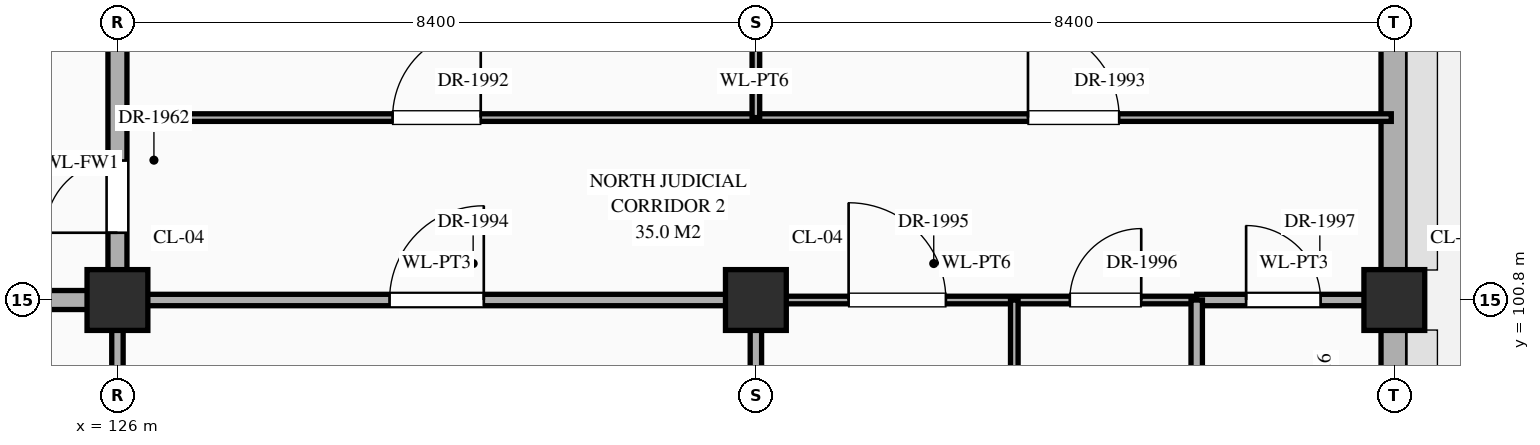
"""IFC4 building model, lengths in metres.
Left out: names, types, materials, properties, quantities, classifications, styles, units other than length and angle.
Written with IfcOpenShell. Run it as: python <this file> out.ifc"""

import sys

from ifc_helpers import new_model, si_unit, direction, frame, frame_2d, origin, origin_2d, place, context, subcontext, project, spatial, rectangle, extrude, element, fill, save


model = new_model("IFC4")
c1 = context("Model", 3, precision=1e-05, world=origin(), true_north=direction((0.0, 1.0)))
c2 = subcontext(c1, "Body", "Model", "MODEL_VIEW")
j1 = project(units=[si_unit("LENGTHUNIT", "METRE"), si_unit("PLANEANGLEUNIT", "RADIAN")], contexts=[c1])
p1 = place(None, origin())
s1 = spatial("IfcSite", under=j1, at=p1, CompositionType="ELEMENT")
p2 = place(p1, origin())
s2 = spatial("IfcBuilding", under=s1, at=p2, CompositionType="ELEMENT")
p3 = place(p2, frame((0.0, 0.0, 21.6)))
s3 = spatial("IfcBuildingStorey", under=s2, at=p3, CompositionType="ELEMENT", Elevation=21.6)
for number, where, z_axis, x_axis in (
    (1, (126.0, 100.8, 0.0), (0.0, 0.0, 1.0), (1.0, 0.0, 0.0)),
    (2, (134.4, 100.8, 0.0), (0.0, 0.0, 1.0), (1.0, 0.0, 0.0)),
    (3, (142.8, 100.8, 0.0), (0.0, 0.0, 1.0), (1.0, 0.0, 0.0)),
):
    element("IfcColumn", number, at=place(p3, frame(where, z_axis=z_axis, x_axis=x_axis)), inside=s3, PredefinedType="COLUMN", context=c2, shape_type="SweptSolid", body=[
        extrude(rectangle(XDim=0.8, YDim=0.8, at=origin_2d()), origin(), (0.0, 0.0, 1.0), 4.5),
    ])
p4 = place(p3, frame((142.8, 93.995, 0.0), z_axis=(0.0, 0.0, 1.0), x_axis=(0.0, 1.0, 0.0)))
e4 = element("IfcWall", 4, at=p4, inside=s3, PredefinedType="STANDARD", context=c2, shape_type="SweptSolid", body=[
    extrude(rectangle(XDim=6.41, YDim=0.35, at=frame_2d((3.205, 0.0))), origin(), (0.0, 0.0, 1.0), 3.59),
])
p5 = place(p4, frame((3.73, 0.0, 0.85)))
e5 = element("IfcOpeningElement", 5, at=p5, cuts=e4, PredefinedType="OPENING", context=c2, shape_type="SweptSolid", body=[
    extrude(rectangle(XDim=1.55, YDim=1.38, at=frame_2d((0.775, 0.69))), frame((0.0, 0.187, 0.0), z_axis=(0.0, -1.0, 0.0), x_axis=(1.0, 0.0, 0.0)), (0.0, 0.0, 1.0), 0.374),
])
p6 = place(p3, frame((142.8, 101.195, 0.0), z_axis=(0.0, 0.0, 1.0), x_axis=(0.0, 1.0, 0.0)))
e6 = element("IfcWall", 6, at=p6, inside=s3, PredefinedType="STANDARD", context=c2, shape_type="SweptSolid", body=[
    extrude(rectangle(XDim=6.41, YDim=0.35, at=frame_2d((3.205, 0.0))), origin(), (0.0, 0.0, 1.0), 3.59),
])
p7 = place(p6, frame((3.73, 0.0, 0.85)))
e7 = element("IfcOpeningElement", 7, at=p7, cuts=e6, PredefinedType="OPENING", context=c2, shape_type="SweptSolid", body=[
    extrude(rectangle(XDim=1.55, YDim=1.56, at=frame_2d((0.775, 0.78))), frame((0.0, 0.187, 0.0), z_axis=(0.0, -1.0, 0.0), x_axis=(1.0, 0.0, 0.0)), (0.0, 0.0, 1.0), 0.374),
])
p8 = place(p3, frame((121.8, 100.8, 0.0), z_axis=(0.0, 0.0, 1.0), x_axis=(1.0, 0.0, 0.0)))
e8 = element("IfcWall", 8, at=p8, inside=s3, PredefinedType="STANDARD", context=c2, shape_type="SweptSolid", body=[
    extrude(rectangle(XDim=4.2, YDim=0.25, at=frame_2d((2.1, 0.0))), origin(), (0.0, 0.0, 1.0), 3.39),
])
p9 = place(p3, frame((126.0, 100.8, 0.0), z_axis=(0.0, 0.0, 1.0), x_axis=(1.0, 0.0, 0.0)))
e9 = element("IfcWall", 9, at=p9, inside=s3, PredefinedType="STANDARD", context=c2, shape_type="SweptSolid", body=[
    extrude(rectangle(XDim=8.4, YDim=0.15, at=frame_2d((4.2, 0.0))), origin(), (0.0, 0.0, 1.0), 3.39),
])
p10 = place(p9, frame((3.58, 0.0, 0.0)))
e10 = element("IfcOpeningElement", 10, at=p10, cuts=e9, PredefinedType="OPENING", context=c2, shape_type="SweptSolid", body=[
    extrude(rectangle(XDim=1.24, YDim=2.3, at=frame_2d((0.62, 1.15))), frame((0.0, 0.087, 0.0), z_axis=(0.0, -1.0, 0.0), x_axis=(1.0, 0.0, 0.0)), (0.0, 0.0, 1.0), 0.174),
])
p11 = place(p3, frame((134.4, 100.8, 0.0), z_axis=(0.0, 0.0, 1.0), x_axis=(1.0, 0.0, 0.0)))
e11 = element("IfcWall", 11, at=p11, inside=s3, PredefinedType="STANDARD", context=c2, shape_type="SweptSolid", body=[
    extrude(rectangle(XDim=5.8, YDim=0.1, at=frame_2d((2.9, 0.0))), origin(), (0.0, 0.0, 1.0), 3.39),
])
p12 = place(p11, frame((1.22, 0.0, 0.0)))
e12 = element("IfcOpeningElement", 12, at=p12, cuts=e11, PredefinedType="OPENING", context=c2, shape_type="SweptSolid", body=[
    extrude(rectangle(XDim=1.28, YDim=2.35, at=frame_2d((0.64, 1.175))), frame((0.0, 0.062, 0.0), z_axis=(0.0, -1.0, 0.0), x_axis=(1.0, 0.0, 0.0)), (0.0, 0.0, 1.0), 0.124),
])
p13 = place(p11, frame((4.13, 0.0, 0.0)))
e13 = element("IfcOpeningElement", 13, at=p13, cuts=e11, PredefinedType="OPENING", context=c2, shape_type="SweptSolid", body=[
    extrude(rectangle(XDim=0.94, YDim=2.3, at=frame_2d((0.47, 1.15))), frame((0.0, 0.062, 0.0), z_axis=(0.0, -1.0, 0.0), x_axis=(1.0, 0.0, 0.0)), (0.0, 0.0, 1.0), 0.124),
])
p14 = place(p3, frame((140.2, 100.8, 0.0), z_axis=(0.0, 0.0, 1.0), x_axis=(1.0, 0.0, 0.0)))
e14 = element("IfcWall", 14, at=p14, inside=s3, PredefinedType="STANDARD", context=c2, shape_type="SweptSolid", body=[
    extrude(rectangle(XDim=2.56, YDim=0.15, at=frame_2d((1.28, 0.0))), origin(), (0.0, 0.0, 1.0), 3.39),
])
p15 = place(p14, frame((0.65, 0.0, 0.0)))
e15 = element("IfcOpeningElement", 15, at=p15, cuts=e14, PredefinedType="OPENING", context=c2, shape_type="SweptSolid", body=[
    extrude(rectangle(XDim=0.98, YDim=2.35, at=frame_2d((0.49, 1.175))), frame((0.0, 0.087, 0.0), z_axis=(0.0, -1.0, 0.0), x_axis=(1.0, 0.0, 0.0)), (0.0, 0.0, 1.0), 0.174),
])
p16 = place(p3, frame((126.0, 103.2, 0.0), z_axis=(0.0, 0.0, 1.0), x_axis=(1.0, 0.0, 0.0)))
e16 = element("IfcWall", 16, at=p16, inside=s3, PredefinedType="STANDARD", context=c2, shape_type="SweptSolid", body=[
    extrude(rectangle(XDim=16.76, YDim=0.1, at=frame_2d((8.38, 0.0))), origin(), (0.0, 0.0, 1.0), 4.24),
])
p17 = place(p16, frame((3.62, 0.0, 0.0)))
e17 = element("IfcOpeningElement", 17, at=p17, cuts=e16, PredefinedType="OPENING", context=c2, shape_type="SweptSolid", body=[
    extrude(rectangle(XDim=1.16, YDim=2.3, at=frame_2d((0.58, 1.15))), frame((0.0, 0.062, 0.0), z_axis=(0.0, -1.0, 0.0), x_axis=(1.0, 0.0, 0.0)), (0.0, 0.0, 1.0), 0.124),
])
p18 = place(p16, frame((11.98, 0.0, 0.0)))
e18 = element("IfcOpeningElement", 18, at=p18, cuts=e16, PredefinedType="OPENING", context=c2, shape_type="SweptSolid", body=[
    extrude(rectangle(XDim=1.2, YDim=2.35, at=frame_2d((0.6, 1.175))), frame((0.0, 0.062, 0.0), z_axis=(0.0, -1.0, 0.0), x_axis=(1.0, 0.0, 0.0)), (0.0, 0.0, 1.0), 0.124),
])
p19 = place(p3, frame((126.0, 96.0, 0.0), z_axis=(0.0, 0.0, 1.0), x_axis=(0.0, 1.0, 0.0)))
e19 = element("IfcWall", 19, at=p19, inside=s3, PredefinedType="STANDARD", context=c2, shape_type="SweptSolid", body=[
    extrude(rectangle(XDim=4.8, YDim=0.15, at=frame_2d((2.4, 0.0))), origin(), (0.0, 0.0, 1.0), 3.49),
])
p20 = place(p3, frame((126.0, 100.8, 0.0), z_axis=(0.0, 0.0, 1.0), x_axis=(0.0, 1.0, 0.0)))
e20 = element("IfcWall", 20, at=p20, inside=s3, PredefinedType="STANDARD", context=c2, shape_type="SweptSolid", body=[
    extrude(rectangle(XDim=3.6, YDim=0.25, at=frame_2d((1.8, 0.0))), origin(), (0.0, 0.0, 1.0), 3.49),
])
p21 = place(p20, frame((0.885, 0.0, 0.0)))
e21 = element("IfcOpeningElement", 21, at=p21, cuts=e20, PredefinedType="OPENING", context=c2, shape_type="SweptSolid", body=[
    extrude(rectangle(XDim=0.95, YDim=2.15, at=frame_2d((0.475, 1.075))), frame((0.0, 0.137, 0.0), z_axis=(0.0, -1.0, 0.0), x_axis=(1.0, 0.0, 0.0)), (0.0, 0.0, 1.0), 0.274),
])
p22 = place(p3, frame((134.4, 96.0, 0.0), z_axis=(0.0, 0.0, 1.0), x_axis=(0.0, 1.0, 0.0)))
e22 = element("IfcWall", 22, at=p22, inside=s3, PredefinedType="STANDARD", context=c2, shape_type="SweptSolid", body=[
    extrude(rectangle(XDim=4.8, YDim=0.15, at=frame_2d((2.4, 0.0))), origin(), (0.0, 0.0, 1.0), 4.24),
])
p23 = place(p3, frame((134.4, 103.2, 0.0), z_axis=(0.0, 0.0, 1.0), x_axis=(0.0, 1.0, 0.0)))
e23 = element("IfcWall", 23, at=p23, inside=s3, PredefinedType="STANDARD", context=c2, shape_type="SweptSolid", body=[
    extrude(rectangle(XDim=4.76, YDim=0.1, at=frame_2d((2.38, 0.0))), origin(), (0.0, 0.0, 1.0), 3.49),
])
p24 = place(p3, frame((137.8, 96.0, 0.0), z_axis=(0.0, 0.0, 1.0), x_axis=(0.0, 1.0, 0.0)))
e24 = element("IfcWall", 24, at=p24, inside=s3, PredefinedType="STANDARD", context=c2, shape_type="SweptSolid", body=[
    extrude(rectangle(XDim=4.8, YDim=0.1, at=frame_2d((2.4, 0.0))), origin(), (0.0, 0.0, 1.0), 4.24),
])
p25 = place(p24, frame((1.92, 0.0, 0.0)))
e25 = element("IfcOpeningElement", 25, at=p25, cuts=e24, PredefinedType="OPENING", context=c2, shape_type="SweptSolid", body=[
    extrude(rectangle(XDim=0.96, YDim=2.2, at=frame_2d((0.48, 1.1))), frame((0.0, 0.062, 0.0), z_axis=(0.0, -1.0, 0.0), x_axis=(1.0, 0.0, 0.0)), (0.0, 0.0, 1.0), 0.124),
])
p26 = place(p3, frame((140.2, 96.0, 0.0), z_axis=(0.0, 0.0, 1.0), x_axis=(0.0, 1.0, 0.0)))
e26 = element("IfcWall", 26, at=p26, inside=s3, PredefinedType="STANDARD", context=c2, shape_type="SweptSolid", body=[
    extrude(rectangle(XDim=4.8, YDim=0.15, at=frame_2d((2.4, 0.0))), origin(), (0.0, 0.0, 1.0), 4.24),
])
p27 = place(p26, frame((1.9, 0.0, 0.0)))
e27 = element("IfcOpeningElement", 27, at=p27, cuts=e26, PredefinedType="OPENING", context=c2, shape_type="SweptSolid", body=[
    extrude(rectangle(XDim=1.0, YDim=2.25, at=frame_2d((0.5, 1.125))), frame((0.0, 0.087, 0.0), z_axis=(0.0, -1.0, 0.0), x_axis=(1.0, 0.0, 0.0)), (0.0, 0.0, 1.0), 0.174),
])
p28 = place(p21, origin())
e28 = element("IfcDoor", 28, at=p28, inside=s3, OperationType="SINGLE_SWING_LEFT", PredefinedType="DOOR", context=c2, shape_type="SweptSolid", body=[
    extrude(rectangle(XDim=0.95, YDim=2.15, at=frame_2d((0.475, 1.075))), frame((0.0, 0.025, 0.0), z_axis=(0.0, -1.0, 0.0), x_axis=(1.0, 0.0, 0.0)), (0.0, 0.0, 1.0), 0.05),
])
fill(e21, e28)
p29 = place(p17, origin())
e29 = element("IfcDoor", 29, at=p29, inside=s3, OperationType="SINGLE_SWING_RIGHT", PredefinedType="DOOR", context=c2, shape_type="SweptSolid", body=[
    extrude(rectangle(XDim=1.16, YDim=2.3, at=frame_2d((0.58, 1.15))), frame((0.0, 0.025, 0.0), z_axis=(0.0, -1.0, 0.0), x_axis=(1.0, 0.0, 0.0)), (0.0, 0.0, 1.0), 0.05),
])
fill(e17, e29)
p30 = place(p18, origin())
e30 = element("IfcDoor", 30, at=p30, inside=s3, OperationType="SINGLE_SWING_LEFT", PredefinedType="DOOR", context=c2, shape_type="SweptSolid", body=[
    extrude(rectangle(XDim=1.2, YDim=2.35, at=frame_2d((0.6, 1.175))), frame((0.0, 0.025, 0.0), z_axis=(0.0, -1.0, 0.0), x_axis=(1.0, 0.0, 0.0)), (0.0, 0.0, 1.0), 0.05),
])
fill(e18, e30)
p31 = place(p10, origin())
e31 = element("IfcDoor", 31, at=p31, inside=s3, OperationType="SINGLE_SWING_RIGHT", PredefinedType="DOOR", context=c2, shape_type="SweptSolid", body=[
    extrude(rectangle(XDim=1.24, YDim=2.3, at=frame_2d((0.62, 1.15))), frame((0.0, 0.025, 0.0), z_axis=(0.0, -1.0, 0.0), x_axis=(1.0, 0.0, 0.0)), (0.0, 0.0, 1.0), 0.05),
])
fill(e10, e31)
p32 = place(p12, origin())
e32 = element("IfcDoor", 32, at=p32, inside=s3, OperationType="SINGLE_SWING_LEFT", PredefinedType="DOOR", context=c2, shape_type="SweptSolid", body=[
    extrude(rectangle(XDim=1.28, YDim=2.35, at=frame_2d((0.64, 1.175))), frame((0.0, 0.025, 0.0), z_axis=(0.0, -1.0, 0.0), x_axis=(1.0, 0.0, 0.0)), (0.0, 0.0, 1.0), 0.05),
])
fill(e12, e32)
p33 = place(p13, origin())
e33 = element("IfcDoor", 33, at=p33, inside=s3, OperationType="SINGLE_SWING_RIGHT", PredefinedType="DOOR", context=c2, shape_type="SweptSolid", body=[
    extrude(rectangle(XDim=0.94, YDim=2.3, at=frame_2d((0.47, 1.15))), frame((0.0, 0.025, 0.0), z_axis=(0.0, -1.0, 0.0), x_axis=(1.0, 0.0, 0.0)), (0.0, 0.0, 1.0), 0.05),
])
fill(e13, e33)
p34 = place(p15, origin())
e34 = element("IfcDoor", 34, at=p34, inside=s3, OperationType="SINGLE_SWING_LEFT", PredefinedType="DOOR", context=c2, shape_type="SweptSolid", body=[
    extrude(rectangle(XDim=0.98, YDim=2.35, at=frame_2d((0.49, 1.175))), frame((0.0, 0.025, 0.0), z_axis=(0.0, -1.0, 0.0), x_axis=(1.0, 0.0, 0.0)), (0.0, 0.0, 1.0), 0.05),
])
fill(e15, e34)
save(model, sys.argv[1])
